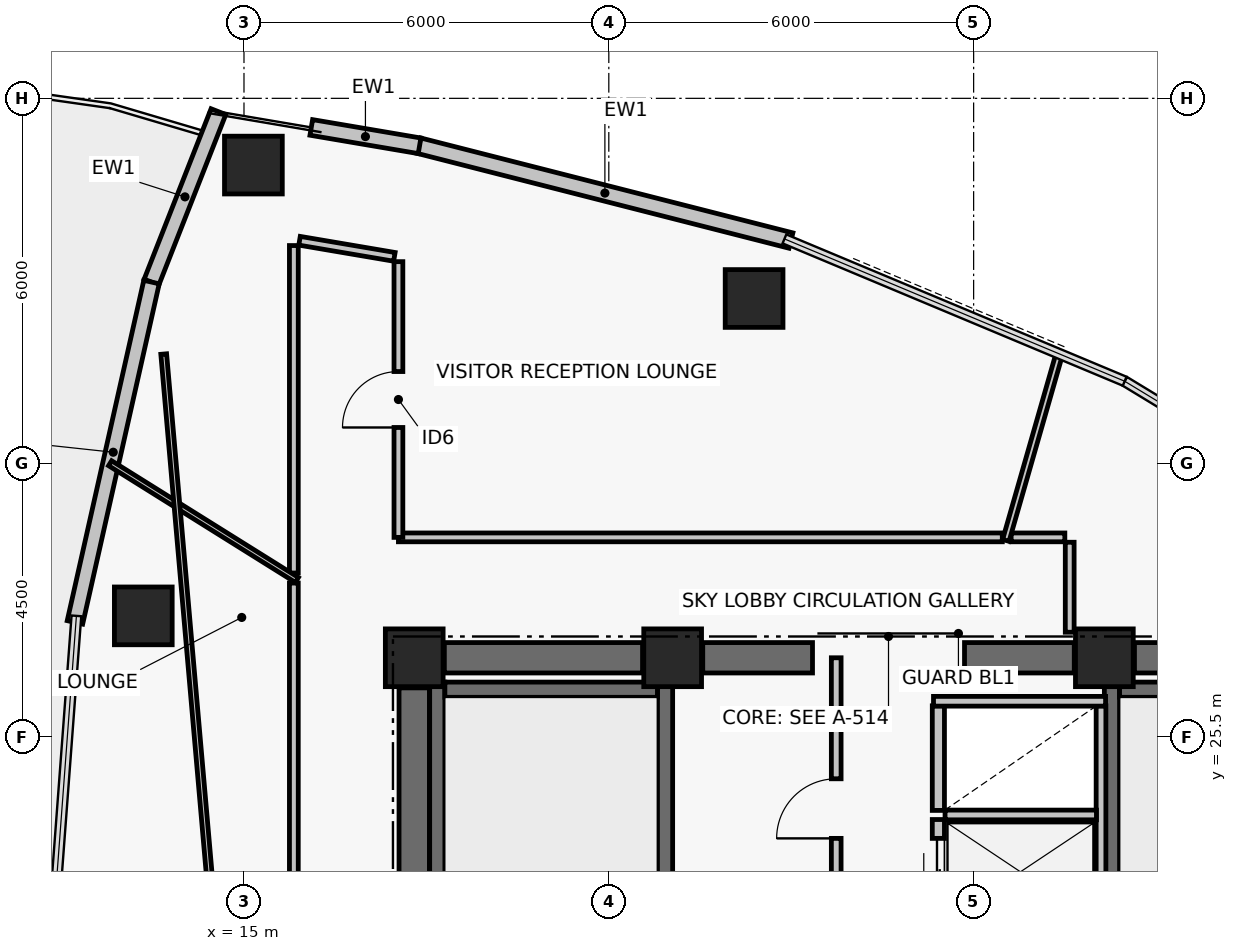
"""IFC4 building model, lengths in metres.
Left out: names, types, materials, properties, quantities, classifications, styles, units other than length and angle.
Written with IfcOpenShell. Run it as: python <this file> out.ifc"""

import sys

from ifc_helpers import new_model, si_unit, direction, frame, frame_2d, origin, origin_2d, place, context, subcontext, project, spatial, rectangle, hollow_rectangle, extrude, element, fill, save


model = new_model("IFC4")
c1 = context("Model", 3, precision=1e-05, world=origin(), true_north=direction((0.0, 1.0)))
c2 = subcontext(c1, "Body", "Model", "MODEL_VIEW")
j1 = project(units=[si_unit("LENGTHUNIT", "METRE"), si_unit("PLANEANGLEUNIT", "RADIAN")], contexts=[c1])
p1 = place(None, origin())
s1 = spatial("IfcSite", under=j1, at=p1, CompositionType="ELEMENT")
p2 = place(p1, origin())
s2 = spatial("IfcBuilding", under=s1, at=p2, CompositionType="ELEMENT")
p3 = place(p2, frame((0.0, 0.0, 206.4)))
s3 = spatial("IfcBuildingStorey", under=s2, at=p3, CompositionType="ELEMENT", Elevation=206.4)
for number, where, z_axis, x_axis in (
    (1, (17.8, 26.8, 0.0), (0.0, 0.0, 1.0), (1.0, 0.0, 0.0)),
    (2, (22.05, 26.8, 0.0), (0.0, 0.0, 1.0), (1.0, 0.0, 0.0)),
    (3, (29.15, 26.8, 0.0), (0.0, 0.0, 1.0), (1.0, 0.0, 0.0)),
):
    element("IfcColumn", number, at=place(p3, frame(where, z_axis=z_axis, x_axis=x_axis)), inside=s3, PredefinedType="COLUMN", context=c2, shape_type="SweptSolid", body=[
        extrude(rectangle(XDim=0.95, YDim=0.95, at=origin_2d()), origin(), (0.0, 0.0, 1.0), 3.72),
    ])
p4 = place(p3, frame((18.295, 26.8, 0.0), z_axis=(0.0, 0.0, 1.0), x_axis=(1.0, 0.0, 0.0)))
e4 = element("IfcWall", 4, at=p4, inside=s3, PredefinedType="SHEAR", context=c2, shape_type="SweptSolid", body=[
    extrude(rectangle(XDim=3.26, YDim=0.5, at=frame_2d((1.63, 0.0))), origin(), (0.0, 0.0, 1.0), 3.5),
])
p5 = place(p3, frame((22.545, 26.8, 0.0), z_axis=(0.0, 0.0, 1.0), x_axis=(1.0, 0.0, 0.0)))
e5 = element("IfcWall", 5, at=p5, inside=s3, PredefinedType="SHEAR", context=c2, shape_type="SweptSolid", body=[
    extrude(rectangle(XDim=1.805, YDim=0.5, at=frame_2d((0.903, 0.0))), origin(), (0.0, 0.0, 1.0), 3.5),
])
p6 = place(p3, frame((26.85, 26.8, 0.0), z_axis=(0.0, 0.0, 1.0), x_axis=(1.0, 0.0, 0.0)))
e6 = element("IfcWall", 6, at=p6, inside=s3, PredefinedType="SHEAR", context=c2, shape_type="SweptSolid", body=[
    extrude(rectangle(XDim=1.805, YDim=0.5, at=frame_2d((0.902, 0.0))), origin(), (0.0, 0.0, 1.0), 3.5),
])
p7 = place(p3, frame((29.645, 26.8, 0.0), z_axis=(0.0, 0.0, 1.0), x_axis=(1.0, 0.0, 0.0)))
e7 = element("IfcWall", 7, at=p7, inside=s3, PredefinedType="SHEAR", context=c2, shape_type="SweptSolid", body=[
    extrude(rectangle(XDim=3.26, YDim=0.5, at=frame_2d((1.63, 0.0))), origin(), (0.0, 0.0, 1.0), 3.5),
])
p8 = place(p3, frame((17.8, 17.695, 0.0), z_axis=(0.0, 0.0, 1.0), x_axis=(0.0, 1.0, 0.0)))
e8 = element("IfcWall", 8, at=p8, inside=s3, PredefinedType="SHEAR", context=c2, shape_type="SweptSolid", body=[
    extrude(rectangle(XDim=8.61, YDim=0.5, at=frame_2d((4.305, 0.0))), origin(), (0.0, 0.0, 1.0), 3.5),
])
p9 = place(p3, frame((18.179, 17.6, 0.0), z_axis=(0.0, 0.0, 1.0), x_axis=(0.0, 1.0, 0.0)))
e9 = element("IfcWall", 9, at=p9, inside=s3, PredefinedType="SHEAR", context=c2, shape_type="SweptSolid", body=[
    extrude(rectangle(XDim=8.8, YDim=0.25, at=frame_2d((4.4, 0.0))), origin(), (0.0, 0.0, 1.0), 3.5),
])
p10 = place(p3, frame((21.925, 17.6, 0.0), z_axis=(0.0, 0.0, 1.0), x_axis=(0.0, 1.0, 0.0)))
e10 = element("IfcWall", 10, at=p10, inside=s3, PredefinedType="SHEAR", context=c2, shape_type="SweptSolid", body=[
    extrude(rectangle(XDim=8.8, YDim=0.25, at=frame_2d((4.4, 0.0))), origin(), (0.0, 0.0, 1.0), 3.5),
])
p11 = place(p10, frame((0.35, 0.0, 0.0)))
e11 = element("IfcOpeningElement", 11, at=p11, cuts=e10, PredefinedType="OPENING", context=c2, shape_type="SweptSolid", body=[
    extrude(rectangle(XDim=1.05, YDim=2.08, at=frame_2d((0.525, 1.04))), frame((0.0, 0.135, 0.0), z_axis=(0.0, -1.0, 0.0), x_axis=(1.0, 0.0, 0.0)), (0.0, 0.0, 1.0), 0.27),
])
p12 = place(p3, frame((18.304, 26.275, 0.0), z_axis=(0.0, 0.0, 1.0), x_axis=(1.0, 0.0, 0.0)))
e12 = element("IfcWall", 12, at=p12, inside=s3, PredefinedType="SHEAR", context=c2, shape_type="SweptSolid", body=[
    extrude(rectangle(XDim=3.496, YDim=0.25, at=frame_2d((1.748, 0.0))), origin(), (0.0, 0.0, 1.0), 3.5),
])
p13 = place(p3, frame((29.275, 17.6, 0.0), z_axis=(0.0, 0.0, 1.0), x_axis=(0.0, 1.0, 0.0)))
e13 = element("IfcWall", 13, at=p13, inside=s3, PredefinedType="SHEAR", context=c2, shape_type="SweptSolid", body=[
    extrude(rectangle(XDim=8.8, YDim=0.25, at=frame_2d((4.4, 0.0))), origin(), (0.0, 0.0, 1.0), 3.5),
])
p14 = place(p13, frame((0.35, 0.0, 0.0)))
e14 = element("IfcOpeningElement", 14, at=p14, cuts=e13, PredefinedType="OPENING", context=c2, shape_type="SweptSolid", body=[
    extrude(rectangle(XDim=1.05, YDim=2.08, at=frame_2d((0.525, 1.04))), frame((0.0, 0.135, 0.0), z_axis=(0.0, -1.0, 0.0), x_axis=(1.0, 0.0, 0.0)), (0.0, 0.0, 1.0), 0.27),
])
p15 = place(p3, frame((29.4, 26.275, 0.0), z_axis=(0.0, 0.0, 1.0), x_axis=(1.0, 0.0, 0.0)))
e15 = element("IfcWall", 15, at=p15, inside=s3, PredefinedType="SHEAR", context=c2, shape_type="SweptSolid", body=[
    extrude(rectangle(XDim=3.496, YDim=0.25, at=frame_2d((1.748, 0.0))), origin(), (0.0, 0.0, 1.0), 3.5),
])
for number, where, z_axis, x_axis in (
    (16, (23.389, 32.708, 0.0), (0.0, 0.0, 1.0), (1.0, 0.0, 0.0)),
    (17, (15.155, 34.903, 0.0), (0.0, 0.0, 1.0), (1.0, 0.0, 0.0)),
    (18, (13.344, 27.489, 0.0), (0.0, 0.0, 1.0), (1.0, 0.0, 0.0)),
):
    element("IfcColumn", number, at=place(p3, frame(where, z_axis=z_axis, x_axis=x_axis)), inside=s3, PredefinedType="COLUMN", context=c2, shape_type="SweptSolid", body=[
        extrude(hollow_rectangle(XDim=0.95, YDim=0.95, WallThickness=0.04, at=origin_2d()), origin(), (0.0, 0.0, 1.0), 3.72),
    ])
p16 = place(p3, frame((17.876, 35.222, 0.0), z_axis=(0.0, 0.0, 1.0), x_axis=(0.968976240439, -0.247153890246, 0.0)))
e19 = element("IfcWall", 19, at=p16, inside=s3, PredefinedType="PARTITIONING", context=c2, shape_type="SweptSolid", body=[
    extrude(rectangle(XDim=6.315, YDim=0.26, at=frame_2d((3.157, 0.0))), origin(), (0.0, 0.0, 1.0), 3.5),
])
p17 = place(p3, frame((16.107, 35.522, 0.0), z_axis=(0.0, 0.0, 1.0), x_axis=(0.985877723898, -0.167466753484, 0.0)))
e20 = element("IfcWall", 20, at=p17, inside=s3, PredefinedType="PARTITIONING", context=c2, shape_type="SweptSolid", body=[
    extrude(rectangle(XDim=1.806, YDim=0.26, at=frame_2d((0.903, 0.0))), origin(), (0.0, 0.0, 1.0), 3.5),
])
p18 = place(p3, frame((13.479, 32.979, 0.0), z_axis=(0.0, 0.0, 1.0), x_axis=(0.365609724313, 0.930768246927, 0.0)))
e21 = element("IfcWall", 21, at=p18, inside=s3, PredefinedType="PARTITIONING", context=c2, shape_type="SweptSolid", body=[
    extrude(rectangle(XDim=3.011, YDim=0.26, at=frame_2d((1.505, 0.0))), origin(), (0.0, 0.0, 1.0), 3.5),
])
p19 = place(p3, frame((12.22, 27.382, 0.0), z_axis=(0.0, 0.0, 1.0), x_axis=(0.219475737697, 0.975617958303, 0.0)))
e22 = element("IfcWall", 22, at=p19, inside=s3, PredefinedType="PARTITIONING", context=c2, shape_type="SweptSolid", body=[
    extrude(rectangle(XDim=5.737, YDim=0.26, at=frame_2d((2.868, 0.0))), origin(), (0.0, 0.0, 1.0), 3.5),
])
p20 = place(p3, frame((26.42, 22.42, 0.0), z_axis=(0.0, 0.0, 1.0), x_axis=(0.0, 1.0, 0.0)))
e23 = element("IfcWall", 23, at=p20, inside=s3, PredefinedType="PARTITIONING", context=c2, shape_type="SweptSolid", body=[
    extrude(rectangle(XDim=1.72, YDim=0.2, at=frame_2d((0.86, 0.0))), origin(), (0.0, 0.0, 1.0), 3.5),
])
p21 = place(p20, frame((0.31, 0.0, 0.0)))
e24 = element("IfcOpeningElement", 24, at=p21, cuts=e23, PredefinedType="OPENING", context=c2, shape_type="SweptSolid", body=[
    extrude(rectangle(XDim=1.1, YDim=2.08, at=frame_2d((0.55, 1.04))), frame((0.0, 0.11, 0.0), z_axis=(0.0, -1.0, 0.0), x_axis=(1.0, 0.0, 0.0)), (0.0, 0.0, 1.0), 0.22),
])
p22 = place(p3, frame((26.42, 24.29, 0.0), z_axis=(0.0, 0.0, 1.0), x_axis=(0.0, 1.0, 0.0)))
e25 = element("IfcWall", 25, at=p22, inside=s3, PredefinedType="PARTITIONING", context=c2, shape_type="SweptSolid", body=[
    extrude(rectangle(XDim=1.72, YDim=0.2, at=frame_2d((0.86, 0.0))), origin(), (0.0, 0.0, 1.0), 3.5),
])
p23 = place(p3, frame((29.095, 20.56, 0.0), z_axis=(0.0, 0.0, 1.0), x_axis=(0.0, 1.0, 0.0)))
e26 = element("IfcWall", 26, at=p23, inside=s3, PredefinedType="PARTITIONING", context=c2, shape_type="SweptSolid", body=[
    extrude(rectangle(XDim=5.45, YDim=0.16, at=frame_2d((2.725, 0.0))), origin(), (0.0, 0.0, 1.0), 3.5),
])
p24 = place(p3, frame((26.53, 24.215, 0.0), z_axis=(0.0, 0.0, 1.0), x_axis=(1.0, 0.0, 0.0)))
e27 = element("IfcWall", 27, at=p24, inside=s3, PredefinedType="PARTITIONING", context=c2, shape_type="SweptSolid", body=[
    extrude(rectangle(XDim=2.49, YDim=0.16, at=frame_2d((1.245, 0.0))), origin(), (0.0, 0.0, 1.0), 3.5),
])
p25 = place(p3, frame((26.34, 26.085, 0.0), z_axis=(0.0, 0.0, 1.0), x_axis=(1.0, 0.0, 0.0)))
e28 = element("IfcWall", 28, at=p25, inside=s3, PredefinedType="PARTITIONING", context=c2, shape_type="SweptSolid", body=[
    extrude(rectangle(XDim=2.83, YDim=0.16, at=frame_2d((1.415, 0.0))), origin(), (0.0, 0.0, 1.0), 3.5),
])
p26 = place(p3, frame((24.74, 22.43, 0.0), z_axis=(0.0, 0.0, 1.0), x_axis=(0.0, 1.0, 0.0)))
e29 = element("IfcWall", 29, at=p26, inside=s3, PredefinedType="PARTITIONING", context=c2, shape_type="SweptSolid", body=[
    extrude(rectangle(XDim=4.37, YDim=0.16, at=frame_2d((2.185, 0.0))), origin(), (0.0, 0.0, 1.0), 2.21),
])
p27 = place(p26, frame((1.4, 0.0, 0.0)))
e30 = element("IfcOpeningElement", 30, at=p27, cuts=e29, PredefinedType="OPENING", context=c2, shape_type="SweptSolid", body=[
    extrude(rectangle(XDim=0.98, YDim=2.06, at=frame_2d((0.49, 1.03))), frame((0.0, 0.09, 0.0), z_axis=(0.0, -1.0, 0.0), x_axis=(1.0, 0.0, 0.0)), (0.0, 0.0, 1.0), 0.18),
])
p28 = place(p3, frame((28.58, 27.22, 0.0), z_axis=(0.0, 0.0, 1.0), x_axis=(0.0, 1.0, 0.0)))
e31 = element("IfcWall", 31, at=p28, inside=s3, PredefinedType="PARTITIONING", context=c2, shape_type="SweptSolid", body=[
    extrude(rectangle(XDim=1.48, YDim=0.145, at=frame_2d((0.74, 0.0))), origin(), (0.0, 0.0, 1.0), 2.63),
])
p29 = place(p3, frame((28.5, 28.78, 0.0), z_axis=(0.0, 0.0, 1.0), x_axis=(-1.0, 0.0, 0.0)))
e32 = element("IfcWall", 32, at=p29, inside=s3, PredefinedType="PARTITIONING", context=c2, shape_type="SweptSolid", body=[
    extrude(rectangle(XDim=0.883, YDim=0.145, at=frame_2d((0.441, 0.0))), origin(), (0.0, 0.0, 1.0), 3.5),
])
p30 = place(p3, frame((27.471, 28.78, 0.0), z_axis=(0.0, 0.0, 1.0), x_axis=(-1.0, 0.0, 0.0)))
e33 = element("IfcWall", 33, at=p30, inside=s3, PredefinedType="PARTITIONING", context=c2, shape_type="SweptSolid", body=[
    extrude(rectangle(XDim=9.931, YDim=0.145, at=frame_2d((4.966, 0.0))), origin(), (0.0, 0.0, 1.0), 2.73),
])
p31 = place(p3, frame((17.54, 28.78, 0.0), z_axis=(0.0, 0.0, 1.0), x_axis=(0.0, 1.0, 0.0)))
e34 = element("IfcWall", 34, at=p31, inside=s3, PredefinedType="PARTITIONING", context=c2, shape_type="SweptSolid", body=[
    extrude(rectangle(XDim=4.534, YDim=0.145, at=frame_2d((2.267, 0.0))), origin(), (0.0, 0.0, 1.0), 3.13),
])
p32 = place(p31, frame((1.807, 0.0, 0.0)))
e35 = element("IfcOpeningElement", 35, at=p32, cuts=e34, PredefinedType="OPENING", context=c2, shape_type="SweptSolid", body=[
    extrude(rectangle(XDim=0.92, YDim=2.05, at=frame_2d((0.46, 1.025))), frame((0.0, 0.083, 0.0), z_axis=(0.0, -1.0, 0.0), x_axis=(1.0, 0.0, 0.0)), (0.0, 0.0, 1.0), 0.165),
])
p33 = place(p3, frame((17.473, 33.393, 0.0), z_axis=(0.0, 0.0, 1.0), x_axis=(-0.985914419316, 0.167250583809, 0.0)))
e36 = element("IfcWall", 36, at=p33, inside=s3, PredefinedType="PARTITIONING", context=c2, shape_type="SweptSolid", body=[
    extrude(rectangle(XDim=1.582, YDim=0.145, at=frame_2d((0.791, 0.0))), origin(), (0.0, 0.0, 1.0), 3.5),
])
p34 = place(p3, frame((15.82, 33.579, 0.0), z_axis=(0.0, 0.0, 1.0), x_axis=(0.0, -1.0, 0.0)))
e37 = element("IfcWall", 37, at=p34, inside=s3, PredefinedType="PARTITIONING", context=c2, shape_type="SweptSolid", body=[
    extrude(rectangle(XDim=5.385, YDim=0.145, at=frame_2d((2.693, 0.0))), origin(), (0.0, 0.0, 1.0), 2.73),
])
p35 = place(p3, frame((15.82, 28.029, 0.0), z_axis=(0.0, 0.0, 1.0), x_axis=(0.0, -1.0, 0.0)))
e38 = element("IfcWall", 38, at=p35, inside=s3, PredefinedType="PARTITIONING", context=c2, shape_type="SweptSolid", body=[
    extrude(rectangle(XDim=14.741, YDim=0.145, at=frame_2d((7.37, 0.0))), origin(), (0.0, 0.0, 1.0), 2.73),
])
p36 = place(p35, frame((5.241, 0.0, 0.0)))
e39 = element("IfcOpeningElement", 39, at=p36, cuts=e38, PredefinedType="OPENING", context=c2, shape_type="SweptSolid", body=[
    extrude(rectangle(XDim=0.95, YDim=2.06, at=frame_2d((0.475, 1.03))), frame((0.0, 0.083, 0.0), z_axis=(0.0, -1.0, 0.0), x_axis=(1.0, 0.0, 0.0)), (0.0, 0.0, 1.0), 0.165),
])
p37 = place(p3, frame((27.53, 28.73, 0.0), z_axis=(0.0, 0.0, 1.0), x_axis=(0.275627571295, 0.961264501551, 0.0)))
e40 = element("IfcWall", 40, at=p37, inside=s3, PredefinedType="PARTITIONING", context=c2, shape_type="SweptSolid", body=[
    extrude(rectangle(XDim=3.201, YDim=0.11, at=frame_2d((1.601, 0.0))), origin(), (0.0, 0.0, 1.0), 2.93),
])
p38 = place(p3, frame((15.87, 28.08, 0.0), z_axis=(0.0, 0.0, 1.0), x_axis=(-0.848062676376, 0.529895930291, 0.0)))
e41 = element("IfcWall", 41, at=p38, inside=s3, PredefinedType="PARTITIONING", context=c2, shape_type="SweptSolid", body=[
    extrude(rectangle(XDim=3.622, YDim=0.095, at=frame_2d((1.811, 0.0))), origin(), (0.0, 0.0, 1.0), 2.93),
])
p39 = place(p3, frame((13.68, 31.795, 0.0), z_axis=(0.0, 0.0, 1.0), x_axis=(0.087160919272, -0.996194245191, 0.0)))
e42 = element("IfcWall", 42, at=p39, inside=s3, PredefinedType="PARTITIONING", context=c2, shape_type="SweptSolid", body=[
    extrude(rectangle(XDim=21.593, YDim=0.095, at=frame_2d((10.797, 0.0))), origin(), (0.0, 0.0, 1.0), 2.73),
])
p40 = place(p39, frame((10.336, 0.0, 0.0)))
e43 = element("IfcOpeningElement", 43, at=p40, cuts=e42, PredefinedType="OPENING", context=c2, shape_type="SweptSolid", body=[
    extrude(rectangle(XDim=0.92, YDim=2.05, at=frame_2d((0.46, 1.025))), frame((0.0, 0.057, 0.0), z_axis=(0.0, -1.0, 0.0), x_axis=(1.0, 0.0, 0.0)), (0.0, 0.0, 1.0), 0.115),
])
p41 = place(p21, origin())
e44 = element("IfcDoor", 44, at=p41, inside=s3, OperationType="DOUBLE_DOOR_SLIDING", PredefinedType="DOOR", context=c2, shape_type="SweptSolid", body=[
    extrude(rectangle(XDim=1.1, YDim=2.08, at=frame_2d((0.55, 1.04))), frame((0.0, 0.025, 0.0), z_axis=(0.0, -1.0, 0.0), x_axis=(1.0, 0.0, 0.0)), (0.0, 0.0, 1.0), 0.05),
])
fill(e24, e44)
p42 = place(p27, origin())
e45 = element("IfcDoor", 45, at=p42, inside=s3, OperationType="SINGLE_SWING_LEFT", PredefinedType="DOOR", context=c2, shape_type="SweptSolid", body=[
    extrude(rectangle(XDim=0.98, YDim=2.06, at=frame_2d((0.49, 1.03))), frame((0.0, 0.025, 0.0), z_axis=(0.0, -1.0, 0.0), x_axis=(1.0, 0.0, 0.0)), (0.0, 0.0, 1.0), 0.05),
])
fill(e30, e45)
p43 = place(p32, origin())
e46 = element("IfcDoor", 46, at=p43, inside=s3, OperationType="SINGLE_SWING_LEFT", PredefinedType="DOOR", context=c2, shape_type="SweptSolid", body=[
    extrude(rectangle(XDim=0.92, YDim=2.05, at=frame_2d((0.46, 1.025))), frame((0.0, 0.025, 0.0), z_axis=(0.0, -1.0, 0.0), x_axis=(1.0, 0.0, 0.0)), (0.0, 0.0, 1.0), 0.05),
])
fill(e35, e46)
save(model, sys.argv[1])
